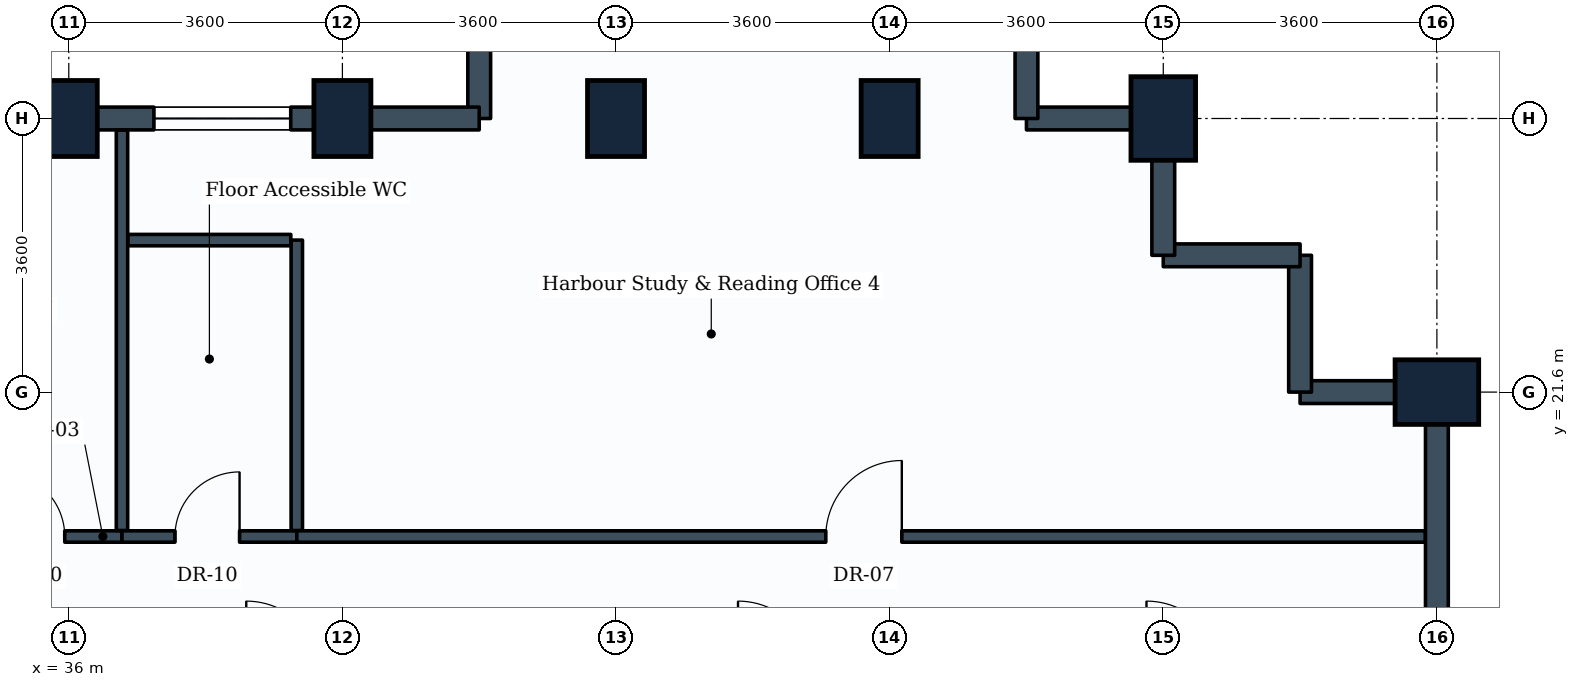
"""IFC4 building model, lengths in metres.
Left out: names, types, materials, properties, quantities, classifications, styles, units other than length and angle.
Written with IfcOpenShell. Run it as: python <this file> out.ifc"""

import sys

from ifc_helpers import new_model, si_unit, direction, frame, frame_2d, origin, origin_2d, place, context, subcontext, project, spatial, rectangle, extrude, element, fill, save


model = new_model("IFC4")
c1 = context("Model", 3, precision=1e-05, world=origin(), true_north=direction((0.0, 1.0)))
c2 = subcontext(c1, "Body", "Model", "MODEL_VIEW")
j1 = project(units=[si_unit("LENGTHUNIT", "METRE"), si_unit("PLANEANGLEUNIT", "RADIAN")], contexts=[c1])
p1 = place(None, origin())
s1 = spatial("IfcSite", under=j1, at=p1, CompositionType="ELEMENT")
p2 = place(p1, origin())
s2 = spatial("IfcBuilding", under=s1, at=p2, CompositionType="ELEMENT")
p3 = place(p2, frame((0.0, 0.0, 142.8)))
s3 = spatial("IfcBuildingStorey", under=s2, at=p3, CompositionType="ELEMENT", Elevation=142.8)
for number, where, z_axis, x_axis in (
    (1, (36.0, 25.2, 0.0), (0.0, 0.0, 1.0), (1.0, 0.0, 0.0)),
    (2, (39.6, 25.2, 0.0), (0.0, 0.0, 1.0), (1.0, 0.0, 0.0)),
    (3, (43.2, 25.2, 0.0), (0.0, 0.0, 1.0), (1.0, 0.0, 0.0)),
    (4, (46.8, 25.2, 0.0), (0.0, 0.0, 1.0), (1.0, 0.0, 0.0)),
):
    element("IfcColumn", number, at=place(p3, frame(where, z_axis=z_axis, x_axis=x_axis)), inside=s3, PredefinedType="COLUMN", context=c2, shape_type="SweptSolid", body=[
        extrude(rectangle(XDim=0.75, YDim=1.0, at=origin_2d()), origin(), (0.0, 0.0, 1.0), 3.8),
    ])
for number, where, z_axis, x_axis in (
    (5, (50.4, 25.2, 0.0), (0.0, 0.0, 1.0), (1.0, 0.0, 0.0)),
    (6, (54.0, 21.6, 0.0), (0.0, 0.0, 1.0), (0.0, 1.0, 0.0)),
):
    element("IfcColumn", number, at=place(p3, frame(where, z_axis=z_axis, x_axis=x_axis)), inside=s3, PredefinedType="COLUMN", context=c2, shape_type="SweptSolid", body=[
        extrude(rectangle(XDim=0.85, YDim=1.1, at=origin_2d()), origin(), (0.0, 0.0, 1.0), 3.8),
    ])
p4 = place(p3, frame((54.0, 21.6, 0.0), z_axis=(0.0, 0.0, 1.0), x_axis=(0.0, -1.0, 0.0)))
e7 = element("IfcWall", 7, at=p4, inside=s3, PredefinedType="STANDARD", context=c2, shape_type="SweptSolid", body=[
    extrude(rectangle(XDim=3.6, YDim=0.3, at=frame_2d((1.8, 0.0))), origin(), (0.0, 0.0, 1.0), 2.93),
])
p5 = place(p3, frame((52.2, 21.6, 0.0), z_axis=(0.0, 0.0, 1.0), x_axis=(1.0, 0.0, 0.0)))
e8 = element("IfcWall", 8, at=p5, inside=s3, PredefinedType="STANDARD", context=c2, shape_type="SweptSolid", body=[
    extrude(rectangle(XDim=1.8, YDim=0.3, at=frame_2d((0.9, 0.0))), origin(), (0.0, 0.0, 1.0), 2.93),
])
p6 = place(p3, frame((52.2, 23.4, 0.0), z_axis=(0.0, 0.0, 1.0), x_axis=(0.0, -1.0, 0.0)))
e9 = element("IfcWall", 9, at=p6, inside=s3, PredefinedType="STANDARD", context=c2, shape_type="SweptSolid", body=[
    extrude(rectangle(XDim=1.8, YDim=0.3, at=frame_2d((0.9, 0.0))), origin(), (0.0, 0.0, 1.0), 3.535),
])
p7 = place(p3, frame((50.4, 23.4, 0.0), z_axis=(0.0, 0.0, 1.0), x_axis=(1.0, 0.0, 0.0)))
e10 = element("IfcWall", 10, at=p7, inside=s3, PredefinedType="STANDARD", context=c2, shape_type="SweptSolid", body=[
    extrude(rectangle(XDim=1.8, YDim=0.3, at=frame_2d((0.9, 0.0))), origin(), (0.0, 0.0, 1.0), 3.535),
])
p8 = place(p3, frame((50.4, 25.2, 0.0), z_axis=(0.0, 0.0, 1.0), x_axis=(0.0, -1.0, 0.0)))
e11 = element("IfcWall", 11, at=p8, inside=s3, PredefinedType="STANDARD", context=c2, shape_type="SweptSolid", body=[
    extrude(rectangle(XDim=1.8, YDim=0.3, at=frame_2d((0.9, 0.0))), origin(), (0.0, 0.0, 1.0), 2.93),
])
p9 = place(p3, frame((48.6, 25.2, 0.0), z_axis=(0.0, 0.0, 1.0), x_axis=(1.0, 0.0, 0.0)))
e12 = element("IfcWall", 12, at=p9, inside=s3, PredefinedType="STANDARD", context=c2, shape_type="SweptSolid", body=[
    extrude(rectangle(XDim=1.8, YDim=0.3, at=frame_2d((0.9, 0.0))), origin(), (0.0, 0.0, 1.0), 2.93),
])
for number, where, z_axis, x_axis in (
    (13, (48.6, 27.3, 0.0), (0.0, 0.0, 1.0), (0.0, -1.0, 0.0)),
    (14, (41.4, 27.3, 0.0), (0.0, 0.0, 1.0), (0.0, -1.0, 0.0)),
):
    element("IfcWall", number, at=place(p3, frame(where, z_axis=z_axis, x_axis=x_axis)), inside=s3, PredefinedType="STANDARD", context=c2, shape_type="SweptSolid", body=[
        extrude(rectangle(XDim=2.1, YDim=0.3, at=frame_2d((1.05, 0.0))), origin(), (0.0, 0.0, 1.0), 2.93),
    ])
p10 = place(p3, frame((39.6, 25.2, 0.0), z_axis=(0.0, 0.0, 1.0), x_axis=(1.0, 0.0, 0.0)))
e15 = element("IfcWall", 15, at=p10, inside=s3, PredefinedType="STANDARD", context=c2, shape_type="SweptSolid", body=[
    extrude(rectangle(XDim=1.8, YDim=0.3, at=frame_2d((0.9, 0.0))), origin(), (0.0, 0.0, 1.0), 2.93),
])
p11 = place(p3, frame((36.0, 25.2, 0.0), z_axis=(0.0, 0.0, 1.0), x_axis=(1.0, 0.0, 0.0)))
e16 = element("IfcWall", 16, at=p11, inside=s3, PredefinedType="STANDARD", context=c2, shape_type="SweptSolid", body=[
    extrude(rectangle(XDim=3.6, YDim=0.3, at=frame_2d((1.8, 0.0))), origin(), (0.0, 0.0, 1.0), 2.93),
])
p12 = place(p11, frame((1.12, 0.0, 0.85)))
e17 = element("IfcOpeningElement", 17, at=p12, cuts=e16, PredefinedType="OPENING", context=c2, shape_type="SweptSolid", body=[
    extrude(rectangle(XDim=1.8, YDim=1.35, at=frame_2d((0.9, 0.675))), frame((0.0, 0.16, 0.0), z_axis=(0.0, -1.0, 0.0), x_axis=(1.0, 0.0, 0.0)), (0.0, 0.0, 1.0), 0.32),
])
p13 = place(p3, frame((32.4, 25.2, 0.0), z_axis=(0.0, 0.0, 1.0), x_axis=(1.0, 0.0, 0.0)))
e18 = element("IfcWall", 18, at=p13, inside=s3, PredefinedType="STANDARD", context=c2, shape_type="SweptSolid", body=[
    extrude(rectangle(XDim=3.6, YDim=0.3, at=frame_2d((1.8, 0.0))), origin(), (0.0, 0.0, 1.0), 2.93),
])
p14 = place(p3, frame((34.479, 19.7, 0.0), z_axis=(0.0, 0.0, 1.0), x_axis=(1.0, 0.0, 0.0)))
e19 = element("IfcWall", 19, at=p14, inside=s3, PredefinedType="PARTITIONING", context=c2, shape_type="SweptSolid", body=[
    extrude(rectangle(XDim=2.221, YDim=0.15, at=frame_2d((1.11, 0.0))), origin(), (0.0, 0.0, 1.0), 3.22),
])
p15 = place(p14, frame((0.618, 0.0, 0.0)))
e20 = element("IfcOpeningElement", 20, at=p15, cuts=e19, PredefinedType="OPENING", context=c2, shape_type="SweptSolid", body=[
    extrude(rectangle(XDim=0.85, YDim=2.1, at=frame_2d((0.425, 1.05))), frame((0.0, 0.085, 0.0), z_axis=(0.0, -1.0, 0.0), x_axis=(1.0, 0.0, 0.0)), (0.0, 0.0, 1.0), 0.17),
])
p16 = place(p3, frame((36.7, 19.779, 0.0), z_axis=(0.0, 0.0, 1.0), x_axis=(0.0, 1.0, 0.0)))
e21 = element("IfcWall", 21, at=p16, inside=s3, PredefinedType="PARTITIONING", context=c2, shape_type="SweptSolid", body=[
    extrude(rectangle(XDim=5.267, YDim=0.15, at=frame_2d((2.633, 0.0))), origin(), (0.0, 0.0, 1.0), 2.93),
])
p17 = place(p3, frame((36.7, 19.7, 0.0), z_axis=(0.0, 0.0, 1.0), x_axis=(1.0, 0.0, 0.0)))
e22 = element("IfcWall", 22, at=p17, inside=s3, PredefinedType="PARTITIONING", context=c2, shape_type="SweptSolid", body=[
    extrude(rectangle(XDim=2.3, YDim=0.15, at=frame_2d((1.15, 0.0))), origin(), (0.0, 0.0, 1.0), 3.535),
])
p18 = place(p17, frame((0.697, 0.0, 0.0)))
e23 = element("IfcOpeningElement", 23, at=p18, cuts=e22, PredefinedType="OPENING", context=c2, shape_type="SweptSolid", body=[
    extrude(rectangle(XDim=0.85, YDim=2.1, at=frame_2d((0.425, 1.05))), frame((0.0, 0.085, 0.0), z_axis=(0.0, -1.0, 0.0), x_axis=(1.0, 0.0, 0.0)), (0.0, 0.0, 1.0), 0.17),
])
p19 = place(p3, frame((39.0, 19.779, 0.0), z_axis=(0.0, 0.0, 1.0), x_axis=(0.0, 1.0, 0.0)))
e24 = element("IfcWall", 24, at=p19, inside=s3, PredefinedType="PARTITIONING", context=c2, shape_type="SweptSolid", body=[
    extrude(rectangle(XDim=3.821, YDim=0.15, at=frame_2d((1.911, 0.0))), origin(), (0.0, 0.0, 1.0), 3.08),
])
p20 = place(p3, frame((36.779, 23.6, 0.0), z_axis=(0.0, 0.0, 1.0), x_axis=(1.0, 0.0, 0.0)))
e25 = element("IfcWall", 25, at=p20, inside=s3, PredefinedType="PARTITIONING", context=c2, shape_type="SweptSolid", body=[
    extrude(rectangle(XDim=2.142, YDim=0.15, at=frame_2d((1.071, 0.0))), origin(), (0.0, 0.0, 1.0), 3.535),
])
p21 = place(p3, frame((39.0, 19.7, 0.0), z_axis=(0.0, 0.0, 1.0), x_axis=(1.0, 0.0, 0.0)))
e26 = element("IfcWall", 26, at=p21, inside=s3, PredefinedType="PARTITIONING", context=c2, shape_type="SweptSolid", body=[
    extrude(rectangle(XDim=14.846, YDim=0.15, at=frame_2d((7.423, 0.0))), origin(), (0.0, 0.0, 1.0), 2.93),
])
p22 = place(p21, frame((6.96, 0.0, 0.0)))
e27 = element("IfcOpeningElement", 27, at=p22, cuts=e26, PredefinedType="OPENING", context=c2, shape_type="SweptSolid", body=[
    extrude(rectangle(XDim=1.0, YDim=2.1, at=frame_2d((0.5, 1.05))), frame((0.0, 0.085, 0.0), z_axis=(0.0, -1.0, 0.0), x_axis=(1.0, 0.0, 0.0)), (0.0, 0.0, 1.0), 0.17),
])
p23 = place(p12, origin())
e28 = element("IfcWindow", 28, at=p23, inside=s3, PartitioningType="SINGLE_PANEL", PredefinedType="WINDOW", context=c2, shape_type="SweptSolid", body=[
    extrude(rectangle(XDim=1.8, YDim=1.35, at=frame_2d((0.9, 0.675))), frame((0.0, 0.03, 0.0), z_axis=(0.0, -1.0, 0.0), x_axis=(1.0, 0.0, 0.0)), (0.0, 0.0, 1.0), 0.06),
])
fill(e17, e28)
p24 = place(p15, origin())
e29 = element("IfcDoor", 29, at=p24, inside=s3, OperationType="SINGLE_SWING_LEFT", PredefinedType="DOOR", context=c2, shape_type="SweptSolid", body=[
    extrude(rectangle(XDim=0.85, YDim=2.1, at=frame_2d((0.425, 1.05))), frame((0.0, 0.025, 0.0), z_axis=(0.0, -1.0, 0.0), x_axis=(1.0, 0.0, 0.0)), (0.0, 0.0, 1.0), 0.05),
])
fill(e20, e29)
p25 = place(p18, origin())
e30 = element("IfcDoor", 30, at=p25, inside=s3, OperationType="SINGLE_SWING_RIGHT", PredefinedType="DOOR", context=c2, shape_type="SweptSolid", body=[
    extrude(rectangle(XDim=0.85, YDim=2.1, at=frame_2d((0.425, 1.05))), frame((0.0, 0.025, 0.0), z_axis=(0.0, -1.0, 0.0), x_axis=(1.0, 0.0, 0.0)), (0.0, 0.0, 1.0), 0.05),
])
fill(e23, e30)
p26 = place(p22, origin())
e31 = element("IfcDoor", 31, at=p26, inside=s3, OperationType="SINGLE_SWING_RIGHT", PredefinedType="DOOR", context=c2, shape_type="SweptSolid", body=[
    extrude(rectangle(XDim=1.0, YDim=2.1, at=frame_2d((0.5, 1.05))), frame((0.0, 0.025, 0.0), z_axis=(0.0, -1.0, 0.0), x_axis=(1.0, 0.0, 0.0)), (0.0, 0.0, 1.0), 0.05),
])
fill(e27, e31)
save(model, sys.argv[1])
